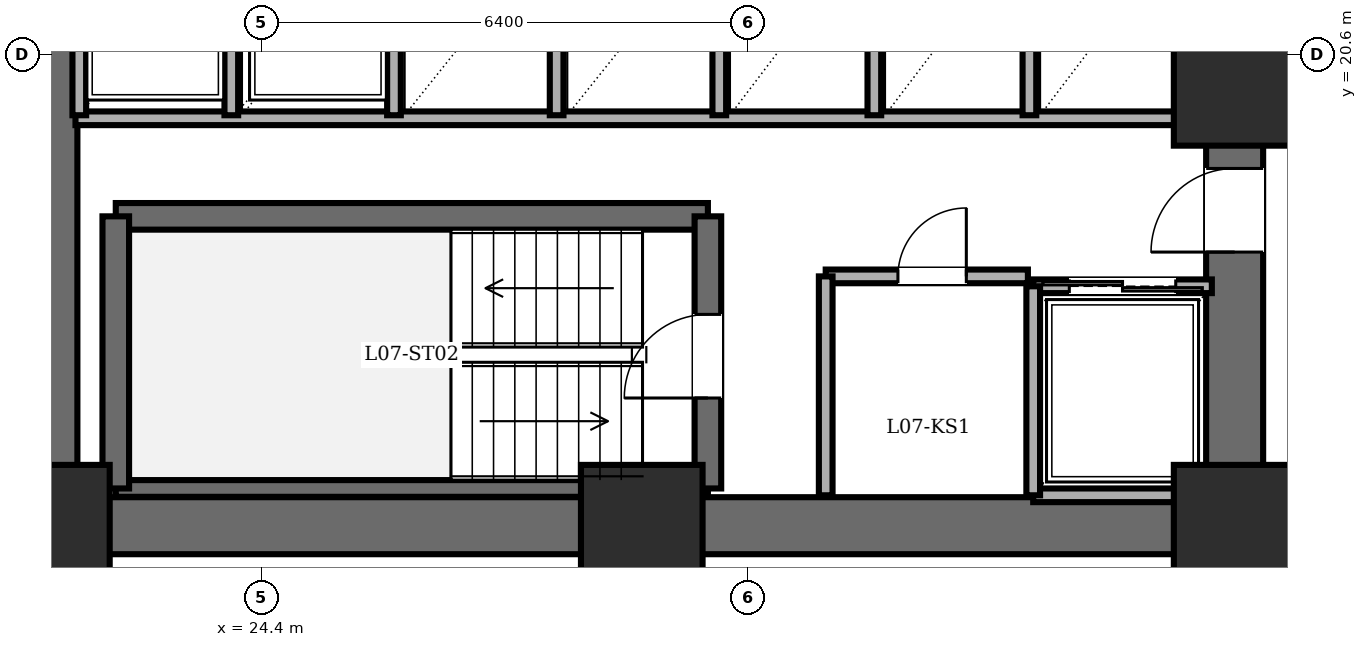
"""IFC4 building model, lengths in metres.
Left out: names, types, materials, properties, quantities, classifications, styles, units other than length and angle.
Written with IfcOpenShell. Run it as: python <this file> out.ifc"""

import sys

from ifc_helpers import new_model, si_unit, direction, frame, frame_2d, origin, origin_2d, place, context, subcontext, project, spatial, rectangle, extrude, element, fill, save


model = new_model("IFC4")
c1 = context("Model", 3, precision=1e-05, world=origin(), true_north=direction((0.0, 1.0)))
c2 = subcontext(c1, "Body", "Model", "MODEL_VIEW")
j1 = project(units=[si_unit("LENGTHUNIT", "METRE"), si_unit("PLANEANGLEUNIT", "RADIAN")], contexts=[c1])
p1 = place(None, origin())
s1 = spatial("IfcSite", under=j1, at=p1, CompositionType="ELEMENT")
p2 = place(p1, origin())
s2 = spatial("IfcBuilding", under=s1, at=p2, CompositionType="ELEMENT")
p3 = place(p2, frame((0.0, 0.0, 28.8)))
s3 = spatial("IfcBuildingStorey", under=s2, at=p3, CompositionType="ELEMENT", Elevation=28.8)
for number, where, z_axis, x_axis in (
    (1, (21.6, 14.4, 0.0), (0.0, 0.0, 1.0), (1.0, 0.0, 0.0)),
    (2, (29.4, 14.4, 0.0), (0.0, 0.0, 1.0), (1.0, 0.0, 0.0)),
    (3, (37.2, 14.4, 0.0), (0.0, 0.0, 1.0), (1.0, 0.0, 0.0)),
    (4, (37.2, 20.2, 0.0), (0.0, 0.0, 1.0), (1.0, 0.0, 0.0)),
):
    element("IfcColumn", number, at=place(p3, frame(where, z_axis=z_axis, x_axis=x_axis)), inside=s3, PredefinedType="COLUMN", context=c2, shape_type="SweptSolid", body=[
        extrude(rectangle(XDim=1.6, YDim=1.6, at=origin_2d()), origin(), (0.0, 0.0, 1.0), 3.6),
    ])
p4 = place(p3, frame((21.6, 14.4, 0.0), z_axis=(0.0, 0.0, 1.0), x_axis=(0.0, 1.0, 0.0)))
e5 = element("IfcWall", 5, at=p4, inside=s3, PredefinedType="SHEAR", context=c2, shape_type="SweptSolid", body=[
    extrude(rectangle(XDim=19.2, YDim=0.75, at=frame_2d((9.6, 0.0))), origin(), (0.0, 0.0, 1.0), 3.4),
])
p5 = place(p3, frame((37.2, 14.4, 0.0), z_axis=(0.0, 0.0, 1.0), x_axis=(-1.0, 0.0, 0.0)))
e6 = element("IfcWall", 6, at=p5, inside=s3, PredefinedType="SHEAR", context=c2, shape_type="SweptSolid", body=[
    extrude(rectangle(XDim=15.6, YDim=0.75, at=frame_2d((7.8, 0.0))), origin(), (0.0, 0.0, 1.0), 3.4),
])
p6 = place(p3, frame((37.2, 14.4, 0.0), z_axis=(0.0, 0.0, 1.0), x_axis=(0.0, 1.0, 0.0)))
e7 = element("IfcWall", 7, at=p6, inside=s3, PredefinedType="SHEAR", context=c2, shape_type="SweptSolid", body=[
    extrude(rectangle(XDim=19.2, YDim=0.75, at=frame_2d((9.6, 0.0))), origin(), (0.0, 0.0, 1.0), 3.4),
])
p7 = place(p6, frame((15.8, 0.0, 0.0)))
e8 = element("IfcOpeningElement", 8, at=p7, cuts=e7, PredefinedType="OPENING", context=c2, shape_type="SweptSolid", body=[
    extrude(rectangle(XDim=1.15, YDim=2.15, at=frame_2d((0.575, 1.075))), frame((0.0, 0.385, 0.0), z_axis=(0.0, -1.0, 0.0), x_axis=(1.0, 0.0, 0.0)), (0.0, 0.0, 1.0), 0.77),
])
p8 = place(p6, frame((3.6, 0.0, 0.0)))
e9 = element("IfcOpeningElement", 9, at=p8, cuts=e7, PredefinedType="OPENING", context=c2, shape_type="SweptSolid", body=[
    extrude(rectangle(XDim=1.1, YDim=2.15, at=frame_2d((0.55, 1.075))), frame((0.0, 0.385, 0.0), z_axis=(0.0, -1.0, 0.0), x_axis=(1.0, 0.0, 0.0)), (0.0, 0.0, 1.0), 0.77),
])
p9 = place(p6, frame((8.6, 0.0, 0.0)))
e10 = element("IfcOpeningElement", 10, at=p9, cuts=e7, PredefinedType="OPENING", context=c2, shape_type="SweptSolid", body=[
    extrude(rectangle(XDim=1.3, YDim=2.2, at=frame_2d((0.65, 1.1))), frame((0.0, 0.385, 0.0), z_axis=(0.0, -1.0, 0.0), x_axis=(1.0, 0.0, 0.0)), (0.0, 0.0, 1.0), 0.77),
])
p10 = place(p3, frame((22.48, 18.47, 0.0), z_axis=(0.0, 0.0, 1.0), x_axis=(1.0, 0.0, 0.0)))
e11 = element("IfcWall", 11, at=p10, inside=s3, PredefinedType="SOLIDWALL", context=c2, shape_type="SweptSolid", body=[
    extrude(rectangle(XDim=7.79, YDim=0.35, at=frame_2d((3.895, 0.0))), origin(), (0.0, 0.0, 1.0), 3.4),
])
p11 = place(p3, frame((22.48, 14.89, 0.0), z_axis=(0.0, 0.0, 1.0), x_axis=(1.0, 0.0, 0.0)))
e12 = element("IfcWall", 12, at=p11, inside=s3, PredefinedType="PARTITIONING", context=c2, shape_type="SweptSolid", body=[
    extrude(rectangle(XDim=7.79, YDim=0.22, at=frame_2d((3.895, 0.0))), origin(), (0.0, 0.0, 1.0), 3.4),
])
p12 = place(p3, frame((22.48, 14.89, 0.0), z_axis=(0.0, 0.0, 1.0), x_axis=(0.0, 1.0, 0.0)))
e13 = element("IfcWall", 13, at=p12, inside=s3, PredefinedType="SOLIDWALL", context=c2, shape_type="SweptSolid", body=[
    extrude(rectangle(XDim=3.58, YDim=0.35, at=frame_2d((1.79, 0.0))), origin(), (0.0, 0.0, 1.0), 3.4),
])
p13 = place(p3, frame((30.27, 14.89, 0.0), z_axis=(0.0, 0.0, 1.0), x_axis=(0.0, 1.0, 0.0)))
e14 = element("IfcWall", 14, at=p13, inside=s3, PredefinedType="SOLIDWALL", context=c2, shape_type="SweptSolid", body=[
    extrude(rectangle(XDim=3.58, YDim=0.35, at=frame_2d((1.79, 0.0))), origin(), (0.0, 0.0, 1.0), 3.4),
])
p14 = place(p13, frame((1.19, 0.0, 0.0)))
e15 = element("IfcOpeningElement", 15, at=p14, cuts=e14, PredefinedType="OPENING", context=c2, shape_type="SweptSolid", body=[
    extrude(rectangle(XDim=1.1, YDim=2.15, at=frame_2d((0.55, 1.075))), frame((0.0, 0.185, 0.0), z_axis=(0.0, -1.0, 0.0), x_axis=(1.0, 0.0, 0.0)), (0.0, 0.0, 1.0), 0.37),
])
p15 = place(p3, frame((21.95, 19.76, 0.0), z_axis=(0.0, 0.0, 1.0), x_axis=(1.0, 0.0, 0.0)))
e16 = element("IfcWall", 16, at=p15, inside=s3, PredefinedType="PARTITIONING", context=c2, shape_type="SweptSolid", body=[
    extrude(rectangle(XDim=14.87, YDim=0.18, at=frame_2d((7.435, 0.0))), origin(), (0.0, 0.0, 1.0), 3.4),
])
p16 = place(p3, frame((31.82, 17.68, 0.0), z_axis=(0.0, 0.0, 1.0), x_axis=(1.0, 0.0, 0.0)))
e17 = element("IfcWall", 17, at=p16, inside=s3, PredefinedType="PARTITIONING", context=c2, shape_type="SweptSolid", body=[
    extrude(rectangle(XDim=2.66, YDim=0.18, at=frame_2d((1.33, 0.0))), origin(), (0.0, 0.0, 1.0), 3.4),
])
p17 = place(p16, frame((0.95, 0.0, 0.0)))
e18 = element("IfcOpeningElement", 18, at=p17, cuts=e17, PredefinedType="OPENING", context=c2, shape_type="SweptSolid", body=[
    extrude(rectangle(XDim=0.9, YDim=2.05, at=frame_2d((0.45, 1.025))), frame((0.0, 0.1, 0.0), z_axis=(0.0, -1.0, 0.0), x_axis=(1.0, 0.0, 0.0)), (0.0, 0.0, 1.0), 0.2),
])
p18 = place(p3, frame((31.82, 14.8, 0.0), z_axis=(0.0, 0.0, 1.0), x_axis=(0.0, 1.0, 0.0)))
e19 = element("IfcWall", 19, at=p18, inside=s3, PredefinedType="PARTITIONING", context=c2, shape_type="SweptSolid", body=[
    extrude(rectangle(XDim=2.88, YDim=0.18, at=frame_2d((1.44, 0.0))), origin(), (0.0, 0.0, 1.0), 3.4),
])
p19 = place(p3, frame((34.55, 17.55, 0.0), z_axis=(0.0, 0.0, 1.0), x_axis=(1.0, 0.0, 0.0)))
e20 = element("IfcWall", 20, at=p19, inside=s3, PredefinedType="PARTITIONING", context=c2, shape_type="SweptSolid", body=[
    extrude(rectangle(XDim=2.35, YDim=0.18, at=frame_2d((1.175, 0.0))), origin(), (0.0, 0.0, 1.0), 3.4),
])
p20 = place(p19, frame((0.475, 0.0, 0.0)))
e21 = element("IfcOpeningElement", 21, at=p20, cuts=e20, PredefinedType="OPENING", context=c2, shape_type="SweptSolid", body=[
    extrude(rectangle(XDim=1.4, YDim=2.3, at=frame_2d((0.7, 1.15))), frame((0.0, 0.1, 0.0), z_axis=(0.0, -1.0, 0.0), x_axis=(1.0, 0.0, 0.0)), (0.0, 0.0, 1.0), 0.2),
])
p21 = place(p3, frame((36.9, 14.8, 0.0), z_axis=(0.0, 0.0, 1.0), x_axis=(-1.0, 0.0, 0.0)))
e22 = element("IfcWall", 22, at=p21, inside=s3, PredefinedType="PARTITIONING", context=c2, shape_type="SweptSolid", body=[
    extrude(rectangle(XDim=2.35, YDim=0.18, at=frame_2d((1.175, 0.0))), origin(), (0.0, 0.0, 1.0), 3.4),
])
p22 = place(p3, frame((34.55, 17.55, 0.0), z_axis=(0.0, 0.0, 1.0), x_axis=(0.0, -1.0, 0.0)))
e23 = element("IfcWall", 23, at=p22, inside=s3, PredefinedType="PARTITIONING", context=c2, shape_type="SweptSolid", body=[
    extrude(rectangle(XDim=2.75, YDim=0.18, at=frame_2d((1.375, 0.0))), origin(), (0.0, 0.0, 1.0), 3.4),
])
for number, where, z_axis, x_axis in (
    (24, (24.0, 19.8, 0.0), (0.0, 0.0, 1.0), (0.0, 1.0, 0.0)),
    (25, (22.0, 22.3, 0.0), (0.0, 0.0, 1.0), (0.0, -1.0, 0.0)),
    (26, (26.14, 19.8, 0.0), (0.0, 0.0, 1.0), (0.0, 1.0, 0.0)),
    (27, (28.28, 19.8, 0.0), (0.0, 0.0, 1.0), (0.0, 1.0, 0.0)),
    (28, (30.42, 19.8, 0.0), (0.0, 0.0, 1.0), (0.0, 1.0, 0.0)),
    (29, (32.46, 19.8, 0.0), (0.0, 0.0, 1.0), (0.0, 1.0, 0.0)),
    (30, (34.5, 19.8, 0.0), (0.0, 0.0, 1.0), (0.0, 1.0, 0.0)),
    (31, (36.54, 19.8, 0.0), (0.0, 0.0, 1.0), (0.0, 1.0, 0.0)),
):
    element("IfcWall", number, at=place(p3, frame(where, z_axis=z_axis, x_axis=x_axis)), inside=s3, PredefinedType="PARTITIONING", context=c2, shape_type="SweptSolid", body=[
        extrude(rectangle(XDim=2.5, YDim=0.18, at=frame_2d((1.25, 0.0))), origin(), (0.0, 0.0, 1.0), 3.4),
    ])
p23 = place(p14, origin())
e32 = element("IfcDoor", 32, at=p23, inside=s3, OperationType="SINGLE_SWING_LEFT", PredefinedType="DOOR", context=c2, shape_type="SweptSolid", body=[
    extrude(rectangle(XDim=1.1, YDim=2.15, at=frame_2d((0.55, 1.075))), frame((0.0, 0.025, 0.0), z_axis=(0.0, -1.0, 0.0), x_axis=(1.0, 0.0, 0.0)), (0.0, 0.0, 1.0), 0.05),
])
fill(e15, e32)
p24 = place(p8, origin())
e33 = element("IfcDoor", 33, at=p24, inside=s3, OperationType="SINGLE_SWING_LEFT", PredefinedType="DOOR", context=c2, shape_type="SweptSolid", body=[
    extrude(rectangle(XDim=1.1, YDim=2.15, at=frame_2d((0.55, 1.075))), frame((0.0, 0.025, 0.0), z_axis=(0.0, -1.0, 0.0), x_axis=(1.0, 0.0, 0.0)), (0.0, 0.0, 1.0), 0.05),
])
fill(e9, e33)
p25 = place(p17, origin())
e34 = element("IfcDoor", 34, at=p25, inside=s3, OperationType="SINGLE_SWING_RIGHT", PredefinedType="DOOR", context=c2, shape_type="SweptSolid", body=[
    extrude(rectangle(XDim=0.9, YDim=2.05, at=frame_2d((0.45, 1.025))), frame((0.0, 0.025, 0.0), z_axis=(0.0, -1.0, 0.0), x_axis=(1.0, 0.0, 0.0)), (0.0, 0.0, 1.0), 0.05),
])
fill(e18, e34)
p26 = place(p20, origin())
e35 = element("IfcDoor", 35, at=p26, inside=s3, OperationType="DOUBLE_DOOR_SLIDING", PredefinedType="DOOR", context=c2, shape_type="SweptSolid", body=[
    extrude(rectangle(XDim=1.4, YDim=2.3, at=frame_2d((0.7, 1.15))), frame((0.0, 0.025, 0.0), z_axis=(0.0, -1.0, 0.0), x_axis=(1.0, 0.0, 0.0)), (0.0, 0.0, 1.0), 0.05),
])
fill(e21, e35)
save(model, sys.argv[1])
